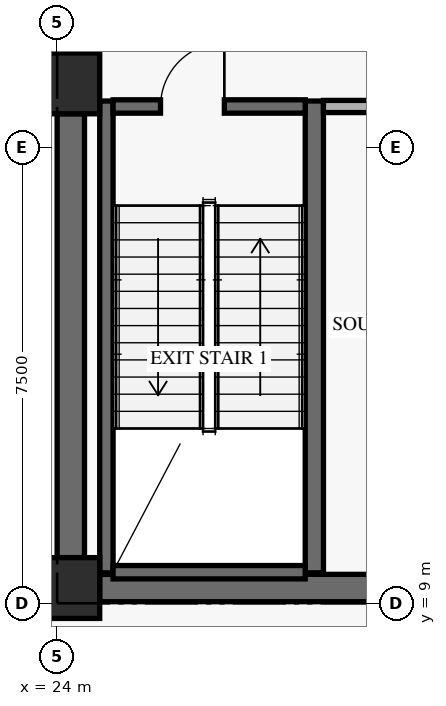
"""IFC4 building model, lengths in metres.
Left out: names, types, materials, properties, quantities, classifications, styles, units other than length and angle.
Written with IfcOpenShell. Run it as: python <this file> out.ifc"""

import sys

from ifc_helpers import new_model, si_unit, direction, frame, frame_2d, origin, origin_2d, place, context, subcontext, project, spatial, rectangle, extrude, element, fill, save


model = new_model("IFC4")
c1 = context("Model", 3, precision=1e-05, world=origin(), true_north=direction((0.0, 1.0)))
c2 = subcontext(c1, "Body", "Model", "MODEL_VIEW")
j1 = project(units=[si_unit("LENGTHUNIT", "METRE"), si_unit("PLANEANGLEUNIT", "RADIAN")], contexts=[c1])
p1 = place(None, origin())
s1 = spatial("IfcSite", under=j1, at=p1, CompositionType="ELEMENT")
p2 = place(p1, origin())
s2 = spatial("IfcBuilding", under=s1, at=p2, CompositionType="ELEMENT")
p3 = place(p2, frame((0.0, 0.0, 14.4)))
s3 = spatial("IfcBuildingStorey", under=s2, at=p3, CompositionType="ELEMENT", Elevation=14.4)
p4 = place(p3, frame((24.225, 9.75, 0.0), z_axis=(0.0, 0.0, 1.0), x_axis=(0.0, 1.0, 0.0)))
e1 = element("IfcWall", 1, at=p4, inside=s3, PredefinedType="SHEAR", context=c2, shape_type="SweptSolid", body=[
    extrude(rectangle(XDim=7.3, YDim=0.45, at=frame_2d((3.65, 0.0))), origin(), (0.0, 0.0, 1.0), 3.62),
])
p5 = place(p3, frame((24.225, 18.05, 0.0), z_axis=(0.0, 0.0, 1.0), x_axis=(0.0, 1.0, 0.0)))
e2 = element("IfcWall", 2, at=p5, inside=s3, PredefinedType="SHEAR", context=c2, shape_type="SweptSolid", body=[
    extrude(rectangle(XDim=11.65, YDim=0.45, at=frame_2d((5.825, 0.0))), origin(), (0.0, 0.0, 1.0), 3.62),
])
p6 = place(p3, frame((24.7, 9.25, 0.0), z_axis=(0.0, 0.0, 1.0), x_axis=(1.0, 0.0, 0.0)))
e3 = element("IfcWall", 3, at=p6, inside=s3, PredefinedType="SHEAR", context=c2, shape_type="SweptSolid", body=[
    extrude(rectangle(XDim=10.0, YDim=0.45, at=frame_2d((5.0, 0.0))), origin(), (0.0, 0.0, 1.0), 4.39),
])
p7 = place(p3, frame((24.81, 9.5, 0.0), z_axis=(0.0, 0.0, 1.0), x_axis=(0.0, 1.0, 0.0)))
e4 = element("IfcWall", 4, at=p7, inside=s3, PredefinedType="SHEAR", context=c2, shape_type="SweptSolid", body=[
    extrude(rectangle(XDim=7.76, YDim=0.22, at=frame_2d((3.88, 0.0))), origin(), (0.0, 0.0, 1.0), 4.39),
])
p8 = place(p3, frame((28.23, 9.5, 0.0), z_axis=(0.0, 0.0, 1.0), x_axis=(0.0, 1.0, 0.0)))
e5 = element("IfcWall", 5, at=p8, inside=s3, PredefinedType="SHEAR", context=c2, shape_type="SweptSolid", body=[
    extrude(rectangle(XDim=7.76, YDim=0.3, at=frame_2d((3.88, 0.0))), origin(), (0.0, 0.0, 1.0), 4.39),
])
p9 = place(p3, frame((24.92, 9.51, 0.0), z_axis=(0.0, 0.0, 1.0), x_axis=(1.0, 0.0, 0.0)))
e6 = element("IfcWall", 6, at=p9, inside=s3, PredefinedType="SHEAR", context=c2, shape_type="SweptSolid", body=[
    extrude(rectangle(XDim=3.16, YDim=0.22, at=frame_2d((1.58, 0.0))), origin(), (0.0, 0.0, 1.0), 4.39),
])
p10 = place(p3, frame((24.92, 17.17, 0.0), z_axis=(0.0, 0.0, 1.0), x_axis=(1.0, 0.0, 0.0)))
e7 = element("IfcWall", 7, at=p10, inside=s3, PredefinedType="SHEAR", context=c2, shape_type="SweptSolid", body=[
    extrude(rectangle(XDim=3.16, YDim=0.22, at=frame_2d((1.58, 0.0))), origin(), (0.0, 0.0, 1.0), 4.39),
])
p11 = place(p10, frame((0.78, 0.0, 0.0)))
e8 = element("IfcOpeningElement", 8, at=p11, cuts=e7, PredefinedType="OPENING", context=c2, shape_type="SweptSolid", body=[
    extrude(rectangle(XDim=1.05, YDim=2.15, at=frame_2d((0.525, 1.075))), frame((0.0, 0.12, 0.0), z_axis=(0.0, -1.0, 0.0), x_axis=(1.0, 0.0, 0.0)), (0.0, 0.0, 1.0), 0.24),
])
for number, where, z_axis, x_axis in (
    (9, (24.2, 9.25, 0.0), (0.0, 0.0, 1.0), (1.0, 0.0, 0.0)),
    (10, (24.2, 17.55, 0.0), (0.0, 0.0, 1.0), (1.0, 0.0, 0.0)),
):
    element("IfcColumn", number, at=place(p3, frame(where, z_axis=z_axis, x_axis=x_axis)), inside=s3, PredefinedType="COLUMN", context=c2, shape_type="SweptSolid", body=[
        extrude(rectangle(XDim=1.0, YDim=1.0, at=origin_2d()), origin(), (0.0, 0.0, 1.0), 4.8),
    ])
p12 = place(p3, frame((28.38, 17.17, 0.0), z_axis=(0.0, 0.0, 1.0), x_axis=(1.0, 0.0, 0.0)))
e11 = element("IfcWall", 11, at=p12, inside=s3, PredefinedType="STANDARD", context=c2, shape_type="SweptSolid", body=[
    extrude(rectangle(XDim=2.9, YDim=0.2, at=frame_2d((1.45, 0.0))), origin(), (0.0, 0.0, 1.0), 4.39),
])
p13 = place(p11, frame((1.05, 0.0, 0.0), z_axis=(0.0, 0.0, 1.0), x_axis=(-1.0, 0.0, 0.0)))
e12 = element("IfcDoor", 12, at=p13, inside=s3, OperationType="SINGLE_SWING_LEFT", PredefinedType="DOOR", context=c2, shape_type="SweptSolid", body=[
    extrude(rectangle(XDim=1.05, YDim=2.15, at=frame_2d((0.525, 1.075))), frame((0.0, 0.025, 0.0), z_axis=(0.0, -1.0, 0.0), x_axis=(1.0, 0.0, 0.0)), (0.0, 0.0, 1.0), 0.05),
])
fill(e8, e12)
save(model, sys.argv[1])
